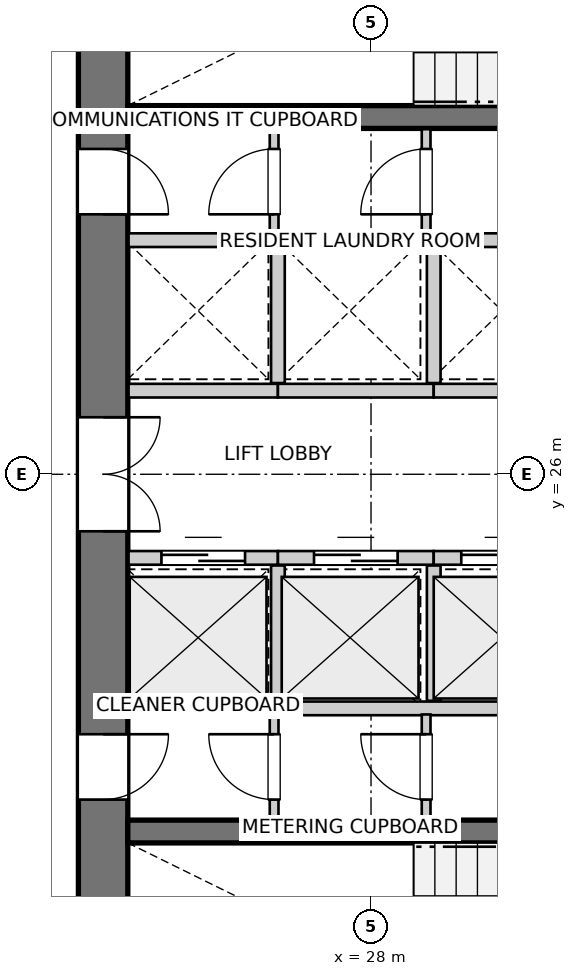
"""IFC4 building model, lengths in metres.
Left out: names, types, materials, properties, quantities, classifications, styles, units other than length and angle.
Written with IfcOpenShell. Run it as: python <this file> out.ifc"""

import sys

from ifc_helpers import new_model, si_unit, direction, frame, frame_2d, origin, place, context, subcontext, project, spatial, rectangle, extrude, source, transform, mapped, element, fill, save


model = new_model("IFC4")
c1 = context("Model", 3, precision=1e-05, world=origin(), true_north=direction((0.0, 1.0)))
c2 = subcontext(c1, "Body", "Model", "MODEL_VIEW")
j1 = project(units=[si_unit("LENGTHUNIT", "METRE"), si_unit("PLANEANGLEUNIT", "RADIAN")], contexts=[c1])
p1 = place(None, origin())
s1 = spatial("IfcSite", under=j1, at=p1, CompositionType="ELEMENT")
p2 = place(p1, origin())
s2 = spatial("IfcBuilding", under=s1, at=p2, CompositionType="ELEMENT")
p3 = place(p2, frame((0.0, 0.0, 92.8)))
s3 = spatial("IfcBuildingStorey", under=s2, at=p3, CompositionType="ELEMENT", Elevation=92.8)
p4 = place(p3, frame((24.475, 33.8, 0.0), z_axis=(0.0, 0.0, 1.0), x_axis=(0.0, -1.0, 0.0)))
e1 = element("IfcWall", 1, at=p4, inside=s3, PredefinedType="SHEAR", context=c2, shape_type="SweptSolid", body=[
    extrude(rectangle(XDim=15.6, YDim=0.65, at=frame_2d((7.8, 0.0))), origin(), (0.0, 0.0, 1.0), 2.95),
])
p5 = place(p4, frame((7.05, 0.0, 0.0)))
e2 = element("IfcOpeningElement", 2, at=p5, cuts=e1, PredefinedType="OPENING", context=c2, shape_type="SweptSolid", body=[
    extrude(rectangle(XDim=1.5, YDim=2.15, at=frame_2d((0.75, 1.075))), frame((0.0, 0.335, 0.0), z_axis=(0.0, -1.0, 0.0), x_axis=(1.0, 0.0, 0.0)), (0.0, 0.0, 1.0), 0.67),
])
p6 = place(p4, frame((3.52, 0.0, 0.0)))
e3 = element("IfcOpeningElement", 3, at=p6, cuts=e1, PredefinedType="OPENING", context=c2, shape_type="SweptSolid", body=[
    extrude(rectangle(XDim=0.86, YDim=2.05, at=frame_2d((0.43, 1.025))), frame((0.0, 0.335, 0.0), z_axis=(0.0, -1.0, 0.0), x_axis=(1.0, 0.0, 0.0)), (0.0, 0.0, 1.0), 0.67),
])
p7 = place(p4, frame((11.22, 0.0, 0.0)))
e4 = element("IfcOpeningElement", 4, at=p7, cuts=e1, PredefinedType="OPENING", context=c2, shape_type="SweptSolid", body=[
    extrude(rectangle(XDim=0.86, YDim=2.05, at=frame_2d((0.43, 1.025))), frame((0.0, 0.335, 0.0), z_axis=(0.0, -1.0, 0.0), x_axis=(1.0, 0.0, 0.0)), (0.0, 0.0, 1.0), 0.67),
])
p8 = place(p3, frame((24.8, 21.3, 0.0), z_axis=(0.0, 0.0, 1.0), x_axis=(1.0, 0.0, 0.0)))
e5 = element("IfcWall", 5, at=p8, inside=s3, PredefinedType="SHEAR", context=c2, shape_type="SweptSolid", body=[
    extrude(rectangle(XDim=11.1, YDim=0.3, at=frame_2d((5.55, 0.0))), origin(), (0.0, 0.0, 1.0), 2.95),
])
p9 = place(p8, frame((6.22, 0.0, 0.0)))
e6 = element("IfcOpeningElement", 6, at=p9, cuts=e5, PredefinedType="OPENING", context=c2, shape_type="SweptSolid", body=[
    extrude(rectangle(XDim=0.98, YDim=2.15, at=frame_2d((0.49, 1.075))), frame((0.0, 0.16, 0.0), z_axis=(0.0, -1.0, 0.0), x_axis=(1.0, 0.0, 0.0)), (0.0, 0.0, 1.0), 0.32),
])
p10 = place(p8, frame((9.15, 0.0, 0.0)))
e7 = element("IfcOpeningElement", 7, at=p10, cuts=e5, PredefinedType="OPENING", context=c2, shape_type="SweptSolid", body=[
    extrude(rectangle(XDim=1.15, YDim=2.15, at=frame_2d((0.575, 1.075))), frame((0.0, 0.16, 0.0), z_axis=(0.0, -1.0, 0.0), x_axis=(1.0, 0.0, 0.0)), (0.0, 0.0, 1.0), 0.32),
])
p11 = place(p3, frame((24.8, 30.7, 0.0), z_axis=(0.0, 0.0, 1.0), x_axis=(1.0, 0.0, 0.0)))
e8 = element("IfcWall", 8, at=p11, inside=s3, PredefinedType="SHEAR", context=c2, shape_type="SweptSolid", body=[
    extrude(rectangle(XDim=11.1, YDim=0.3, at=frame_2d((5.55, 0.0))), origin(), (0.0, 0.0, 1.0), 2.95),
])
p12 = place(p11, frame((6.22, 0.0, 0.0)))
e9 = element("IfcOpeningElement", 9, at=p12, cuts=e8, PredefinedType="OPENING", context=c2, shape_type="SweptSolid", body=[
    extrude(rectangle(XDim=0.98, YDim=2.15, at=frame_2d((0.49, 1.075))), frame((0.0, 0.16, 0.0), z_axis=(0.0, -1.0, 0.0), x_axis=(1.0, 0.0, 0.0)), (0.0, 0.0, 1.0), 0.32),
])
p13 = place(p11, frame((9.15, 0.0, 0.0)))
e10 = element("IfcOpeningElement", 10, at=p13, cuts=e8, PredefinedType="OPENING", context=c2, shape_type="SweptSolid", body=[
    extrude(rectangle(XDim=1.15, YDim=2.15, at=frame_2d((0.575, 1.075))), frame((0.0, 0.16, 0.0), z_axis=(0.0, -1.0, 0.0), x_axis=(1.0, 0.0, 0.0)), (0.0, 0.0, 1.0), 0.32),
])
p14 = place(p3, frame((24.81, 22.92, 0.0), z_axis=(0.0, 0.0, 1.0), x_axis=(1.0, 0.0, 0.0)))
e11 = element("IfcWall", 11, at=p14, inside=s3, PredefinedType="PARTITIONING", context=c2, shape_type="SweptSolid", body=[
    extrude(rectangle(XDim=5.84, YDim=0.18, at=frame_2d((2.92, 0.0))), origin(), (0.0, 0.0, 1.0), 2.95),
])
p15 = place(p3, frame((24.81, 24.9, 0.0), z_axis=(0.0, 0.0, 1.0), x_axis=(1.0, 0.0, 0.0)))
e12 = element("IfcWall", 12, at=p15, inside=s3, PredefinedType="PARTITIONING", context=c2, shape_type="SweptSolid", body=[
    extrude(rectangle(XDim=1.965, YDim=0.18, at=frame_2d((0.982, 0.0))), origin(), (0.0, 0.0, 1.0), 2.95),
])
p16 = place(p15, frame((0.433, 0.0, 0.0)))
e13 = element("IfcOpeningElement", 13, at=p16, cuts=e12, PredefinedType="OPENING", context=c2, shape_type="SweptSolid", body=[
    extrude(rectangle(XDim=1.1, YDim=2.15, at=frame_2d((0.55, 1.075))), frame((0.0, 0.1, 0.0), z_axis=(0.0, -1.0, 0.0), x_axis=(1.0, 0.0, 0.0)), (0.0, 0.0, 1.0), 0.2),
])
p17 = place(p3, frame((26.775, 24.9, 0.0), z_axis=(0.0, 0.0, 1.0), x_axis=(1.0, 0.0, 0.0)))
e14 = element("IfcWall", 14, at=p17, inside=s3, PredefinedType="PARTITIONING", context=c2, shape_type="SweptSolid", body=[
    extrude(rectangle(XDim=2.05, YDim=0.18, at=frame_2d((1.025, 0.0))), origin(), (0.0, 0.0, 1.0), 2.95),
])
p18 = place(p17, frame((0.475, 0.0, 0.0)))
e15 = element("IfcOpeningElement", 15, at=p18, cuts=e14, PredefinedType="OPENING", context=c2, shape_type="SweptSolid", body=[
    extrude(rectangle(XDim=1.1, YDim=2.15, at=frame_2d((0.55, 1.075))), frame((0.0, 0.1, 0.0), z_axis=(0.0, -1.0, 0.0), x_axis=(1.0, 0.0, 0.0)), (0.0, 0.0, 1.0), 0.2),
])
p19 = place(p3, frame((26.775, 23.02, 0.0), z_axis=(0.0, 0.0, 1.0), x_axis=(0.0, 1.0, 0.0)))
e16 = element("IfcWall", 16, at=p19, inside=s3, PredefinedType="PARTITIONING", context=c2, shape_type="SweptSolid", body=[
    extrude(rectangle(XDim=1.78, YDim=0.18, at=frame_2d((0.89, 0.0))), origin(), (0.0, 0.0, 1.0), 2.95),
])
p20 = place(p3, frame((28.825, 24.9, 0.0), z_axis=(0.0, 0.0, 1.0), x_axis=(1.0, 0.0, 0.0)))
e17 = element("IfcWall", 17, at=p20, inside=s3, PredefinedType="PARTITIONING", context=c2, shape_type="SweptSolid", body=[
    extrude(rectangle(XDim=1.825, YDim=0.18, at=frame_2d((0.913, 0.0))), origin(), (0.0, 0.0, 1.0), 2.95),
])
p21 = place(p20, frame((0.363, 0.0, 0.0)))
e18 = element("IfcOpeningElement", 18, at=p21, cuts=e17, PredefinedType="OPENING", context=c2, shape_type="SweptSolid", body=[
    extrude(rectangle(XDim=1.1, YDim=2.15, at=frame_2d((0.55, 1.075))), frame((0.0, 0.1, 0.0), z_axis=(0.0, -1.0, 0.0), x_axis=(1.0, 0.0, 0.0)), (0.0, 0.0, 1.0), 0.2),
])
p22 = place(p3, frame((28.825, 23.02, 0.0), z_axis=(0.0, 0.0, 1.0), x_axis=(0.0, 1.0, 0.0)))
e19 = element("IfcWall", 19, at=p22, inside=s3, PredefinedType="PARTITIONING", context=c2, shape_type="SweptSolid", body=[
    extrude(rectangle(XDim=1.78, YDim=0.18, at=frame_2d((0.89, 0.0))), origin(), (0.0, 0.0, 1.0), 2.95),
])
p23 = place(p3, frame((24.81, 29.08, 0.0), z_axis=(0.0, 0.0, 1.0), x_axis=(1.0, 0.0, 0.0)))
e20 = element("IfcWall", 20, at=p23, inside=s3, PredefinedType="PARTITIONING", context=c2, shape_type="SweptSolid", body=[
    extrude(rectangle(XDim=5.84, YDim=0.18, at=frame_2d((2.92, 0.0))), origin(), (0.0, 0.0, 1.0), 2.95),
])
p24 = place(p3, frame((24.81, 27.1, 0.0), z_axis=(0.0, 0.0, 1.0), x_axis=(1.0, 0.0, 0.0)))
e21 = element("IfcWall", 21, at=p24, inside=s3, PredefinedType="PARTITIONING", context=c2, shape_type="SweptSolid", body=[
    extrude(rectangle(XDim=1.965, YDim=0.18, at=frame_2d((0.982, 0.0))), origin(), (0.0, 0.0, 1.0), 2.95),
])
p25 = place(p3, frame((26.775, 27.1, 0.0), z_axis=(0.0, 0.0, 1.0), x_axis=(1.0, 0.0, 0.0)))
e22 = element("IfcWall", 22, at=p25, inside=s3, PredefinedType="PARTITIONING", context=c2, shape_type="SweptSolid", body=[
    extrude(rectangle(XDim=2.05, YDim=0.18, at=frame_2d((1.025, 0.0))), origin(), (0.0, 0.0, 1.0), 2.95),
])
p26 = place(p3, frame((26.775, 27.2, 0.0), z_axis=(0.0, 0.0, 1.0), x_axis=(0.0, 1.0, 0.0)))
e23 = element("IfcWall", 23, at=p26, inside=s3, PredefinedType="PARTITIONING", context=c2, shape_type="SweptSolid", body=[
    extrude(rectangle(XDim=1.78, YDim=0.18, at=frame_2d((0.89, 0.0))), origin(), (0.0, 0.0, 1.0), 2.95),
])
p27 = place(p3, frame((28.825, 27.1, 0.0), z_axis=(0.0, 0.0, 1.0), x_axis=(1.0, 0.0, 0.0)))
e24 = element("IfcWall", 24, at=p27, inside=s3, PredefinedType="PARTITIONING", context=c2, shape_type="SweptSolid", body=[
    extrude(rectangle(XDim=1.825, YDim=0.18, at=frame_2d((0.913, 0.0))), origin(), (0.0, 0.0, 1.0), 2.95),
])
p28 = place(p3, frame((28.825, 27.2, 0.0), z_axis=(0.0, 0.0, 1.0), x_axis=(0.0, 1.0, 0.0)))
e25 = element("IfcWall", 25, at=p28, inside=s3, PredefinedType="PARTITIONING", context=c2, shape_type="SweptSolid", body=[
    extrude(rectangle(XDim=1.78, YDim=0.18, at=frame_2d((0.89, 0.0))), origin(), (0.0, 0.0, 1.0), 2.95),
])
p29 = place(p3, frame((26.725, 21.46, 0.0), z_axis=(0.0, 0.0, 1.0), x_axis=(0.0, 1.0, 0.0)))
e26 = element("IfcWall", 26, at=p29, inside=s3, PredefinedType="PARTITIONING", context=c2, shape_type="SweptSolid", body=[
    extrude(rectangle(XDim=1.38, YDim=0.115, at=frame_2d((0.69, 0.0))), origin(), (0.0, 0.0, 1.0), 2.95),
])
p30 = place(p29, frame((0.26, 0.0, 0.0)))
e27 = element("IfcOpeningElement", 27, at=p30, cuts=e26, PredefinedType="OPENING", context=c2, shape_type="SweptSolid", body=[
    extrude(rectangle(XDim=0.86, YDim=2.05, at=frame_2d((0.43, 1.025))), frame((0.0, 0.067, 0.0), z_axis=(0.0, -1.0, 0.0), x_axis=(1.0, 0.0, 0.0)), (0.0, 0.0, 1.0), 0.135),
])
p31 = place(p3, frame((26.725, 29.16, 0.0), z_axis=(0.0, 0.0, 1.0), x_axis=(0.0, 1.0, 0.0)))
e28 = element("IfcWall", 28, at=p31, inside=s3, PredefinedType="PARTITIONING", context=c2, shape_type="SweptSolid", body=[
    extrude(rectangle(XDim=1.38, YDim=0.115, at=frame_2d((0.69, 0.0))), origin(), (0.0, 0.0, 1.0), 2.95),
])
p32 = place(p31, frame((0.26, 0.0, 0.0)))
e29 = element("IfcOpeningElement", 29, at=p32, cuts=e28, PredefinedType="OPENING", context=c2, shape_type="SweptSolid", body=[
    extrude(rectangle(XDim=0.86, YDim=2.05, at=frame_2d((0.43, 1.025))), frame((0.0, 0.067, 0.0), z_axis=(0.0, -1.0, 0.0), x_axis=(1.0, 0.0, 0.0)), (0.0, 0.0, 1.0), 0.135),
])
p33 = place(p3, frame((28.725, 21.46, 0.0), z_axis=(0.0, 0.0, 1.0), x_axis=(0.0, 1.0, 0.0)))
e30 = element("IfcWall", 30, at=p33, inside=s3, PredefinedType="PARTITIONING", context=c2, shape_type="SweptSolid", body=[
    extrude(rectangle(XDim=1.38, YDim=0.115, at=frame_2d((0.69, 0.0))), origin(), (0.0, 0.0, 1.0), 2.95),
])
p34 = place(p33, frame((0.26, 0.0, 0.0)))
e31 = element("IfcOpeningElement", 31, at=p34, cuts=e30, PredefinedType="OPENING", context=c2, shape_type="SweptSolid", body=[
    extrude(rectangle(XDim=0.86, YDim=2.05, at=frame_2d((0.43, 1.025))), frame((0.0, 0.067, 0.0), z_axis=(0.0, -1.0, 0.0), x_axis=(1.0, 0.0, 0.0)), (0.0, 0.0, 1.0), 0.135),
])
p35 = place(p3, frame((28.725, 29.16, 0.0), z_axis=(0.0, 0.0, 1.0), x_axis=(0.0, 1.0, 0.0)))
e32 = element("IfcWall", 32, at=p35, inside=s3, PredefinedType="PARTITIONING", context=c2, shape_type="SweptSolid", body=[
    extrude(rectangle(XDim=1.38, YDim=0.115, at=frame_2d((0.69, 0.0))), origin(), (0.0, 0.0, 1.0), 2.95),
])
p36 = place(p35, frame((0.26, 0.0, 0.0)))
e33 = element("IfcOpeningElement", 33, at=p36, cuts=e32, PredefinedType="OPENING", context=c2, shape_type="SweptSolid", body=[
    extrude(rectangle(XDim=0.86, YDim=2.05, at=frame_2d((0.43, 1.025))), frame((0.0, 0.067, 0.0), z_axis=(0.0, -1.0, 0.0), x_axis=(1.0, 0.0, 0.0)), (0.0, 0.0, 1.0), 0.135),
])
m1 = source(origin(), c2, "Body", "SweptSolid", [
    extrude(rectangle(XDim=1.5, YDim=2.15, at=frame_2d((0.75, 1.075))), frame((0.0, 0.025, 0.0), z_axis=(0.0, -1.0, 0.0), x_axis=(1.0, 0.0, 0.0)), (0.0, 0.0, 1.0), 0.05),
])
p37 = place(p5, origin())
e34 = element("IfcDoor", 34, at=p37, inside=s3, OperationType="DOUBLE_DOOR_SINGLE_SWING", PredefinedType="DOOR", context=c2, shape_type="MappedRepresentation", body=[
    mapped(m1, transform((0.0, 0.0, 0.0), x_axis=(1.0, 0.0, 0.0), y_axis=(0.0, 1.0, 0.0), z_axis=(0.0, 0.0, 1.0), scale=1.0)),
])
fill(e2, e34)
m2 = source(origin(), c2, "Body", "SweptSolid", [
    extrude(rectangle(XDim=0.86, YDim=2.05, at=frame_2d((0.43, 1.025))), frame((0.0, 0.025, 0.0), z_axis=(0.0, -1.0, 0.0), x_axis=(1.0, 0.0, 0.0)), (0.0, 0.0, 1.0), 0.05),
])
p38 = place(p6, origin())
e35 = element("IfcDoor", 35, at=p38, inside=s3, OperationType="SINGLE_SWING_RIGHT", PredefinedType="DOOR", context=c2, shape_type="MappedRepresentation", body=[
    mapped(m2, transform((0.0, 0.0, 0.0), x_axis=(1.0, 0.0, 0.0), y_axis=(0.0, 1.0, 0.0), z_axis=(0.0, 0.0, 1.0), scale=1.0)),
])
fill(e3, e35)
p39 = place(p7, origin())
e36 = element("IfcDoor", 36, at=p39, inside=s3, OperationType="SINGLE_SWING_LEFT", PredefinedType="DOOR", context=c2, shape_type="MappedRepresentation", body=[
    mapped(m2, transform((0.0, 0.0, 0.0), x_axis=(1.0, 0.0, 0.0), y_axis=(0.0, 1.0, 0.0), z_axis=(0.0, 0.0, 1.0), scale=1.0)),
])
fill(e4, e36)
m3 = source(origin(), c2, "Body", "SweptSolid", [
    extrude(rectangle(XDim=1.1, YDim=2.15, at=frame_2d((0.55, 1.075))), frame((0.0, 0.025, 0.0), z_axis=(0.0, -1.0, 0.0), x_axis=(1.0, 0.0, 0.0)), (0.0, 0.0, 1.0), 0.05),
])
p40 = place(p16, origin())
e37 = element("IfcDoor", 37, at=p40, inside=s3, OperationType="DOUBLE_DOOR_SLIDING", PredefinedType="DOOR", context=c2, shape_type="MappedRepresentation", body=[
    mapped(m3, transform((0.0, 0.0, 0.0), x_axis=(1.0, 0.0, 0.0), y_axis=(0.0, 1.0, 0.0), z_axis=(0.0, 0.0, 1.0), scale=1.0)),
])
fill(e13, e37)
p41 = place(p18, origin())
e38 = element("IfcDoor", 38, at=p41, inside=s3, OperationType="DOUBLE_DOOR_SLIDING", PredefinedType="DOOR", context=c2, shape_type="MappedRepresentation", body=[
    mapped(m3, transform((0.0, 0.0, 0.0), x_axis=(1.0, 0.0, 0.0), y_axis=(0.0, 1.0, 0.0), z_axis=(0.0, 0.0, 1.0), scale=1.0)),
])
fill(e15, e38)
p42 = place(p21, origin())
e39 = element("IfcDoor", 39, at=p42, inside=s3, OperationType="DOUBLE_DOOR_SLIDING", PredefinedType="DOOR", context=c2, shape_type="MappedRepresentation", body=[
    mapped(m3, transform((0.0, 0.0, 0.0), x_axis=(1.0, 0.0, 0.0), y_axis=(0.0, 1.0, 0.0), z_axis=(0.0, 0.0, 1.0), scale=1.0)),
])
fill(e18, e39)
p43 = place(p30, origin())
e40 = element("IfcDoor", 40, at=p43, inside=s3, OperationType="SINGLE_SWING_RIGHT", PredefinedType="DOOR", context=c2, shape_type="MappedRepresentation", body=[
    mapped(m2, transform((0.0, 0.0, 0.0), x_axis=(1.0, 0.0, 0.0), y_axis=(0.0, 1.0, 0.0), z_axis=(0.0, 0.0, 1.0), scale=1.0)),
])
fill(e27, e40)
p44 = place(p32, origin())
e41 = element("IfcDoor", 41, at=p44, inside=s3, OperationType="SINGLE_SWING_LEFT", PredefinedType="DOOR", context=c2, shape_type="MappedRepresentation", body=[
    mapped(m2, transform((0.0, 0.0, 0.0), x_axis=(1.0, 0.0, 0.0), y_axis=(0.0, 1.0, 0.0), z_axis=(0.0, 0.0, 1.0), scale=1.0)),
])
fill(e29, e41)
p45 = place(p34, origin())
e42 = element("IfcDoor", 42, at=p45, inside=s3, OperationType="SINGLE_SWING_RIGHT", PredefinedType="DOOR", context=c2, shape_type="MappedRepresentation", body=[
    mapped(m2, transform((0.0, 0.0, 0.0), x_axis=(1.0, 0.0, 0.0), y_axis=(0.0, 1.0, 0.0), z_axis=(0.0, 0.0, 1.0), scale=1.0)),
])
fill(e31, e42)
p46 = place(p36, origin())
e43 = element("IfcDoor", 43, at=p46, inside=s3, OperationType="SINGLE_SWING_LEFT", PredefinedType="DOOR", context=c2, shape_type="MappedRepresentation", body=[
    mapped(m2, transform((0.0, 0.0, 0.0), x_axis=(1.0, 0.0, 0.0), y_axis=(0.0, 1.0, 0.0), z_axis=(0.0, 0.0, 1.0), scale=1.0)),
])
fill(e33, e43)
save(model, sys.argv[1])
